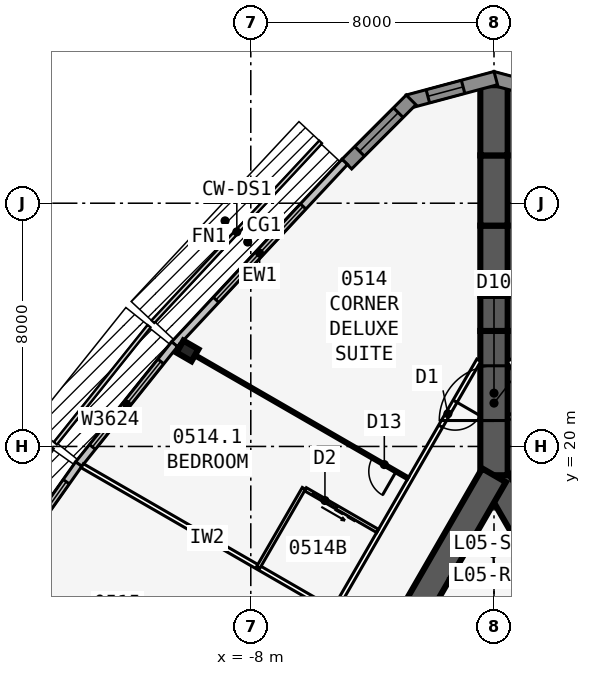
"""IFC4 building model, lengths in metres.
Left out: names, types, materials, properties, quantities, classifications, styles, units other than length and angle.
Written with IfcOpenShell. Run it as: python <this file> out.ifc"""

import sys

from ifc_helpers import new_model, si_unit, direction, frame, frame_2d, origin, origin_2d, place, context, subcontext, project, spatial, polyline, rectangle, i_section, outline, extrude, element, fill, save


model = new_model("IFC4")
c1 = context("Model", 3, precision=1e-05, world=origin(), true_north=direction((0.0, 1.0)))
c2 = subcontext(c1, "Body", "Model", "MODEL_VIEW")
j1 = project(units=[si_unit("LENGTHUNIT", "METRE"), si_unit("PLANEANGLEUNIT", "RADIAN")], contexts=[c1])
p1 = place(None, origin())
s1 = spatial("IfcSite", under=j1, at=p1, CompositionType="ELEMENT")
p2 = place(p1, origin())
s2 = spatial("IfcBuilding", under=s1, at=p2, CompositionType="ELEMENT")
p3 = place(p2, frame((0.0, 0.0, 28.5)))
s3 = spatial("IfcBuildingStorey", under=s2, at=p3, CompositionType="ELEMENT", Elevation=28.5)
p4 = place(p3, frame((16.5, -9.526, 0.0), z_axis=(0.0, 0.0, 1.0), x_axis=(-0.499999749417, 0.866025548458, 0.0)))
e1 = element("IfcWall", 1, at=p4, inside=s3, PredefinedType="SHEAR", context=c2, shape_type="SweptSolid", body=[
    extrude(rectangle(XDim=33.0, YDim=0.9, at=frame_2d((16.5, 0.0))), origin(), (0.0, 0.0, 1.0), 3.4),
])
p5 = place(p4, frame((14.15, 0.0, 0.0)))
e2 = element("IfcOpeningElement", 2, at=p5, cuts=e1, PredefinedType="OPENING", context=c2, shape_type="SweptSolid", body=[
    extrude(rectangle(XDim=1.8, YDim=2.13, at=frame_2d((0.9, 1.065))), frame((0.0, 0.46, 0.0), z_axis=(0.0, -1.0, 0.0), x_axis=(1.0, 0.0, 0.0)), (0.0, 0.0, 1.0), 0.92),
])
p6 = place(p4, frame((12.6, 0.0, 0.0)))
e3 = element("IfcOpeningElement", 3, at=p6, cuts=e1, PredefinedType="OPENING", context=c2, shape_type="SweptSolid", body=[
    extrude(rectangle(XDim=1.0, YDim=2.13, at=frame_2d((0.5, 1.065))), frame((0.0, 0.46, 0.0), z_axis=(0.0, -1.0, 0.0), x_axis=(1.0, 0.0, 0.0)), (0.0, 0.0, 1.0), 0.92),
])
p7 = place(p3, frame((0.0, 19.052, 0.0), z_axis=(0.0, 0.0, 1.0), x_axis=(-0.499999749417, -0.866025548458, 0.0)))
e4 = element("IfcWall", 4, at=p7, inside=s3, PredefinedType="SHEAR", context=c2, shape_type="SweptSolid", body=[
    extrude(rectangle(XDim=33.0, YDim=0.9, at=frame_2d((16.5, 0.0))), origin(), (0.0, 0.0, 1.0), 3.4),
])
p8 = place(p7, frame((14.15, 0.0, 0.0)))
e5 = element("IfcOpeningElement", 5, at=p8, cuts=e4, PredefinedType="OPENING", context=c2, shape_type="SweptSolid", body=[
    extrude(rectangle(XDim=1.8, YDim=2.13, at=frame_2d((0.9, 1.065))), frame((0.0, 0.46, 0.0), z_axis=(0.0, -1.0, 0.0), x_axis=(1.0, 0.0, 0.0)), (0.0, 0.0, 1.0), 0.92),
])
p9 = place(p7, frame((12.6, 0.0, 0.0)))
e6 = element("IfcOpeningElement", 6, at=p9, cuts=e4, PredefinedType="OPENING", context=c2, shape_type="SweptSolid", body=[
    extrude(rectangle(XDim=1.0, YDim=2.13, at=frame_2d((0.5, 1.065))), frame((0.0, 0.46, 0.0), z_axis=(0.0, -1.0, 0.0), x_axis=(1.0, 0.0, 0.0)), (0.0, 0.0, 1.0), 0.92),
])
p10 = place(p3, frame((0.0, 19.052, 0.0), z_axis=(0.0, 0.0, 1.0), x_axis=(0.0, 1.0, 0.0)))
e7 = element("IfcWall", 7, at=p10, inside=s3, PredefinedType="SHEAR", context=c2, shape_type="SweptSolid", body=[
    extrude(rectangle(XDim=4.746, YDim=0.9, at=frame_2d((2.373, 0.0))), origin(), (0.0, 0.0, 1.0), 3.4),
])
p11 = place(p10, frame((1.8, 0.0, 0.0)))
e8 = element("IfcOpeningElement", 8, at=p11, cuts=e7, PredefinedType="OPENING", context=c2, shape_type="SweptSolid", body=[
    extrude(rectangle(XDim=1.8, YDim=2.13, at=frame_2d((0.9, 1.065))), frame((0.0, 0.46, 0.0), z_axis=(0.0, -1.0, 0.0), x_axis=(1.0, 0.0, 0.0)), (0.0, 0.0, 1.0), 0.92),
])
p12 = place(p3, frame((0.0, 23.799, 0.0), z_axis=(0.0, 0.0, 1.0), x_axis=(0.0, 1.0, 0.0)))
e9 = element("IfcWall", 9, at=p12, inside=s3, PredefinedType="SHEAR", context=c2, shape_type="SweptSolid", body=[
    extrude(rectangle(XDim=1.155, YDim=0.9, at=frame_2d((0.577, 0.0))), origin(), (0.0, 0.0, 1.0), 3.4),
])
p13 = place(p3, frame((0.0, 24.953, 0.0), z_axis=(0.0, 0.0, 1.0), x_axis=(0.0, 1.0, 0.0)))
e10 = element("IfcWall", 10, at=p13, inside=s3, PredefinedType="SHEAR", context=c2, shape_type="SweptSolid", body=[
    extrude(rectangle(XDim=2.309, YDim=0.9, at=frame_2d((1.155, 0.0))), origin(), (0.0, 0.0, 1.0), 3.4),
])
p14 = place(p3, frame((0.0, 27.263, 0.0), z_axis=(0.0, 0.0, 1.0), x_axis=(0.0, 1.0, 0.0)))
e11 = element("IfcWall", 11, at=p14, inside=s3, PredefinedType="SHEAR", context=c2, shape_type="SweptSolid", body=[
    extrude(rectangle(XDim=2.31, YDim=0.9, at=frame_2d((1.155, 0.0))), origin(), (0.0, 0.0, 1.0), 3.4),
])
p15 = place(p3, frame((0.0, 29.572, 0.0), z_axis=(0.0, 0.0, 1.0), x_axis=(0.0, 1.0, 0.0)))
e12 = element("IfcWall", 12, at=p15, inside=s3, PredefinedType="SHEAR", context=c2, shape_type="SweptSolid", body=[
    extrude(rectangle(XDim=2.309, YDim=0.9, at=frame_2d((1.155, 0.0))), origin(), (0.0, 0.0, 1.0), 3.4),
])
p16 = place(p3, frame((-10.083, 23.142, 0.0), z_axis=(0.0, 0.0, 1.0), x_axis=(-0.5, -0.866025403784, 0.0)))
e13 = element("IfcColumn", 13, at=p16, inside=s3, PredefinedType="COLUMN", context=c2, shape_type="SweptSolid", body=[
    extrude(i_section(OverallWidth=0.455, OverallDepth=0.569, WebThickness=0.078, FlangeThickness=0.125, at=origin_2d()), origin(), (0.0, 0.0, 1.0), 3.4),
])
p17 = place(p3, frame((2.829, 31.341, 0.0), z_axis=(0.0, 0.0, 1.0), x_axis=(-0.965930548995, 0.258801419081, 0.0)))
e14 = element("IfcWall", 14, at=p17, inside=s3, PredefinedType="SOLIDWALL", context=c2, shape_type="SweptSolid", body=[
    extrude(outline(polyline([(2.989, 0.225), (2.929, 0.225), (2.438, 0.093), (2.402, 0.225), (0.0, 0.225), (0.0, -0.225), (2.989, -0.225), (2.989, 0.225)])), origin(), (0.0, 0.0, 1.0), 3.235),
])
p18 = place(p17, frame((0.676, 0.0, 0.45)))
e15 = element("IfcOpeningElement", 15, at=p18, cuts=e14, PredefinedType="OPENING", context=c2, shape_type="SweptSolid", body=[
    extrude(rectangle(XDim=1.2, YDim=2.4, at=frame_2d((0.6, 1.2))), frame((0.0, 0.235, 0.0), z_axis=(0.0, -1.0, 0.0), x_axis=(1.0, 0.0, 0.0)), (0.0, 0.0, 1.0), 0.47),
])
p19 = place(p3, frame((0.058, 32.114, 0.0), z_axis=(0.0, 0.0, 1.0), x_axis=(-0.965930548995, -0.258801419081, 0.0)))
e16 = element("IfcWall", 16, at=p19, inside=s3, PredefinedType="SOLIDWALL", context=c2, shape_type="SweptSolid", body=[
    extrude(outline(polyline([(2.989, 0.225), (0.586, 0.225), (0.551, 0.093), (0.059, 0.225), (0.0, 0.225), (0.0, -0.225), (2.989, -0.225), (2.989, 0.225)])), origin(), (0.0, 0.0, 1.0), 3.235),
])
p20 = place(p19, frame((1.113, 0.0, 0.45)))
e17 = element("IfcOpeningElement", 17, at=p20, cuts=e16, PredefinedType="OPENING", context=c2, shape_type="SweptSolid", body=[
    extrude(rectangle(XDim=1.2, YDim=2.4, at=frame_2d((0.6, 1.2))), frame((0.0, 0.235, 0.0), z_axis=(0.0, -1.0, 0.0), x_axis=(1.0, 0.0, 0.0)), (0.0, 0.0, 1.0), 0.47),
])
p21 = place(p3, frame((-2.728, 31.399, 0.0), z_axis=(0.0, 0.0, 1.0), x_axis=(-0.707106781187, -0.707106781187, 0.0)))
e18 = element("IfcWall", 18, at=p21, inside=s3, PredefinedType="SOLIDWALL", context=c2, shape_type="SweptSolid", body=[
    extrude(rectangle(XDim=2.988, YDim=0.45, at=frame_2d((1.494, 0.0))), origin(), (0.0, 0.0, 1.0), 3.235),
])
p22 = place(p21, frame((0.594, 0.0, 0.45)))
e19 = element("IfcOpeningElement", 19, at=p22, cuts=e18, PredefinedType="OPENING", context=c2, shape_type="SweptSolid", body=[
    extrude(rectangle(XDim=1.8, YDim=2.4, at=frame_2d((0.9, 1.2))), frame((0.0, 0.235, 0.0), z_axis=(0.0, -1.0, 0.0), x_axis=(1.0, 0.0, 0.0)), (0.0, 0.0, 1.0), 0.47),
])
p23 = place(p3, frame((-4.909, 29.36, 0.0), z_axis=(0.0, 0.0, 1.0), x_axis=(-0.682289646561, -0.731081964075, 0.0)))
e20 = element("IfcWall", 20, at=p23, inside=s3, PredefinedType="STANDARD", context=c2, shape_type="SweptSolid", body=[
    extrude(rectangle(XDim=8.211, YDim=0.25, at=frame_2d((4.105, 0.0))), origin(), (0.0, 0.0, 1.0), 3.235),
])
p24 = place(p23, frame((2.006, 0.0, 0.45)))
e21 = element("IfcOpeningElement", 21, at=p24, cuts=e20, PredefinedType="OPENING", context=c2, shape_type="SweptSolid", body=[
    extrude(rectangle(XDim=4.2, YDim=2.4, at=frame_2d((2.1, 1.2))), frame((0.0, 0.135, 0.0), z_axis=(0.0, -1.0, 0.0), x_axis=(1.0, 0.0, 0.0)), (0.0, 0.0, 1.0), 0.27),
])
p25 = place(p3, frame((-10.505, 23.364, 0.0), z_axis=(0.0, 0.0, 1.0), x_axis=(-0.624594965756, -0.780948864364, 0.0)))
e22 = element("IfcWall", 22, at=p25, inside=s3, PredefinedType="STANDARD", context=c2, shape_type="SweptSolid", body=[
    extrude(rectangle(XDim=5.058, YDim=0.25, at=frame_2d((2.529, 0.0))), origin(), (0.0, 0.0, 1.0), 3.235),
])
p26 = place(p25, frame((0.729, 0.0, 0.45)))
e23 = element("IfcOpeningElement", 23, at=p26, cuts=e22, PredefinedType="OPENING", context=c2, shape_type="SweptSolid", body=[
    extrude(rectangle(XDim=3.6, YDim=2.4, at=frame_2d((1.8, 1.2))), frame((0.0, 0.135, 0.0), z_axis=(0.0, -1.0, 0.0), x_axis=(1.0, 0.0, 0.0)), (0.0, 0.0, 1.0), 0.27),
])
p27 = place(p3, frame((-13.659, 19.42, 0.0), z_axis=(0.0, 0.0, 1.0), x_axis=(-0.5766431066, -0.81699616132, 0.0)))
e24 = element("IfcWall", 24, at=p27, inside=s3, PredefinedType="STANDARD", context=c2, shape_type="SweptSolid", body=[
    extrude(rectangle(XDim=5.021, YDim=0.25, at=frame_2d((2.51, 0.0))), origin(), (0.0, 0.0, 1.0), 3.235),
])
p28 = place(p27, frame((0.71, 0.0, 0.45)))
e25 = element("IfcOpeningElement", 25, at=p28, cuts=e24, PredefinedType="OPENING", context=c2, shape_type="SweptSolid", body=[
    extrude(rectangle(XDim=3.6, YDim=2.4, at=frame_2d((1.8, 1.2))), frame((0.0, 0.135, 0.0), z_axis=(0.0, -1.0, 0.0), x_axis=(1.0, 0.0, 0.0)), (0.0, 0.0, 1.0), 0.27),
])
p29 = place(p3, frame((20.027, -10.985, 0.0), z_axis=(0.0, 0.0, 1.0), x_axis=(-0.500001677587, 0.866024435227, 0.0)))
e26 = element("IfcWall", 26, at=p29, inside=s3, PredefinedType="PARTITIONING", context=c2, shape_type="SweptSolid", body=[
    extrude(rectangle(XDim=39.054, YDim=0.15, at=frame_2d((19.527, 0.0))), origin(), (0.0, 0.0, 1.0), 3.235),
])
p30 = place(p29, frame((0.352, 0.0, 0.0)))
e27 = element("IfcOpeningElement", 27, at=p30, cuts=e26, PredefinedType="OPENING", context=c2, shape_type="SweptSolid", body=[
    extrude(rectangle(XDim=0.95, YDim=2.13, at=frame_2d((0.475, 1.065))), frame((0.0, 0.085, 0.0), z_axis=(0.0, -1.0, 0.0), x_axis=(1.0, 0.0, 0.0)), (0.0, 0.0, 1.0), 0.17),
])
p31 = place(p29, frame((5.952, 0.0, 0.0)))
e28 = element("IfcOpeningElement", 28, at=p31, cuts=e26, PredefinedType="OPENING", context=c2, shape_type="SweptSolid", body=[
    extrude(rectangle(XDim=0.95, YDim=2.13, at=frame_2d((0.475, 1.065))), frame((0.0, 0.085, 0.0), z_axis=(0.0, -1.0, 0.0), x_axis=(1.0, 0.0, 0.0)), (0.0, 0.0, 1.0), 0.17),
])
p32 = place(p29, frame((12.152, 0.0, 0.0)))
e29 = element("IfcOpeningElement", 29, at=p32, cuts=e26, PredefinedType="OPENING", context=c2, shape_type="SweptSolid", body=[
    extrude(rectangle(XDim=0.95, YDim=2.13, at=frame_2d((0.475, 1.065))), frame((0.0, 0.085, 0.0), z_axis=(0.0, -1.0, 0.0), x_axis=(1.0, 0.0, 0.0)), (0.0, 0.0, 1.0), 0.17),
])
p33 = place(p29, frame((15.952, 0.0, 0.0)))
e30 = element("IfcOpeningElement", 30, at=p33, cuts=e26, PredefinedType="OPENING", context=c2, shape_type="SweptSolid", body=[
    extrude(rectangle(XDim=0.95, YDim=2.13, at=frame_2d((0.475, 1.065))), frame((0.0, 0.085, 0.0), z_axis=(0.0, -1.0, 0.0), x_axis=(1.0, 0.0, 0.0)), (0.0, 0.0, 1.0), 0.17),
])
p34 = place(p29, frame((22.152, 0.0, 0.0)))
e31 = element("IfcOpeningElement", 31, at=p34, cuts=e26, PredefinedType="OPENING", context=c2, shape_type="SweptSolid", body=[
    extrude(rectangle(XDim=0.95, YDim=2.13, at=frame_2d((0.475, 1.065))), frame((0.0, 0.085, 0.0), z_axis=(0.0, -1.0, 0.0), x_axis=(1.0, 0.0, 0.0)), (0.0, 0.0, 1.0), 0.17),
])
p35 = place(p29, frame((25.952, 0.0, 0.0)))
e32 = element("IfcOpeningElement", 32, at=p35, cuts=e26, PredefinedType="OPENING", context=c2, shape_type="SweptSolid", body=[
    extrude(rectangle(XDim=0.95, YDim=2.13, at=frame_2d((0.475, 1.065))), frame((0.0, 0.085, 0.0), z_axis=(0.0, -1.0, 0.0), x_axis=(1.0, 0.0, 0.0)), (0.0, 0.0, 1.0), 0.17),
])
p36 = place(p29, frame((36.546, 0.0, 0.0)))
e33 = element("IfcOpeningElement", 33, at=p36, cuts=e26, PredefinedType="OPENING", context=c2, shape_type="SweptSolid", body=[
    extrude(rectangle(XDim=0.95, YDim=2.13, at=frame_2d((0.475, 1.065))), frame((0.0, 0.085, 0.0), z_axis=(0.0, -1.0, 0.0), x_axis=(1.0, 0.0, 0.0)), (0.0, 0.0, 1.0), 0.17),
])
p37 = place(p3, frame((-0.5, 22.836, 0.0), z_axis=(0.0, 0.0, 1.0), x_axis=(-0.500001677587, -0.866024435227, 0.0)))
e34 = element("IfcWall", 34, at=p37, inside=s3, PredefinedType="PARTITIONING", context=c2, shape_type="SweptSolid", body=[
    extrude(rectangle(XDim=39.054, YDim=0.15, at=frame_2d((19.527, 0.0))), origin(), (0.0, 0.0, 1.0), 3.235),
])
p38 = place(p37, frame((1.558, 0.0, 0.0)))
e35 = element("IfcOpeningElement", 35, at=p38, cuts=e34, PredefinedType="OPENING", context=c2, shape_type="SweptSolid", body=[
    extrude(rectangle(XDim=0.95, YDim=2.13, at=frame_2d((0.475, 1.065))), frame((0.0, 0.085, 0.0), z_axis=(0.0, -1.0, 0.0), x_axis=(1.0, 0.0, 0.0)), (0.0, 0.0, 1.0), 0.17),
])
p39 = place(p37, frame((15.352, 0.0, 0.0)))
e36 = element("IfcOpeningElement", 36, at=p39, cuts=e34, PredefinedType="OPENING", context=c2, shape_type="SweptSolid", body=[
    extrude(rectangle(XDim=0.95, YDim=2.13, at=frame_2d((0.475, 1.065))), frame((0.0, 0.085, 0.0), z_axis=(0.0, -1.0, 0.0), x_axis=(1.0, 0.0, 0.0)), (0.0, 0.0, 1.0), 0.17),
])
p40 = place(p37, frame((22.752, 0.0, 0.0)))
e37 = element("IfcOpeningElement", 37, at=p40, cuts=e34, PredefinedType="OPENING", context=c2, shape_type="SweptSolid", body=[
    extrude(rectangle(XDim=0.95, YDim=2.13, at=frame_2d((0.475, 1.065))), frame((0.0, 0.085, 0.0), z_axis=(0.0, -1.0, 0.0), x_axis=(1.0, 0.0, 0.0)), (0.0, 0.0, 1.0), 0.17),
])
p41 = place(p37, frame((30.952, 0.0, 0.0)))
e38 = element("IfcOpeningElement", 38, at=p41, cuts=e34, PredefinedType="OPENING", context=c2, shape_type="SweptSolid", body=[
    extrude(rectangle(XDim=0.95, YDim=2.13, at=frame_2d((0.475, 1.065))), frame((0.0, 0.085, 0.0), z_axis=(0.0, -1.0, 0.0), x_axis=(1.0, 0.0, 0.0)), (0.0, 0.0, 1.0), 0.17),
])
p42 = place(p37, frame((37.752, 0.0, 0.0)))
e39 = element("IfcOpeningElement", 39, at=p42, cuts=e34, PredefinedType="OPENING", context=c2, shape_type="SweptSolid", body=[
    extrude(rectangle(XDim=0.95, YDim=2.13, at=frame_2d((0.475, 1.065))), frame((0.0, 0.085, 0.0), z_axis=(0.0, -1.0, 0.0), x_axis=(1.0, 0.0, 0.0)), (0.0, 0.0, 1.0), 0.17),
])
p43 = place(p3, frame((-2.829, 18.954, 0.0), z_axis=(0.0, 0.0, 1.0), x_axis=(-0.866020536561, 0.500008430184, 0.0)))
e40 = element("IfcWall", 40, at=p43, inside=s3, PredefinedType="PARTITIONING", context=c2, shape_type="SweptSolid", body=[
    extrude(rectangle(XDim=8.72, YDim=0.1, at=frame_2d((4.36, 0.0))), origin(), (0.0, 0.0, 1.0), 2.389),
])
p44 = place(p43, frame((0.45, 0.0, 0.0)))
e41 = element("IfcOpeningElement", 41, at=p44, cuts=e40, PredefinedType="OPENING", context=c2, shape_type="SweptSolid", body=[
    extrude(rectangle(XDim=0.9, YDim=2.13, at=frame_2d((0.45, 1.065))), frame((0.0, 0.06, 0.0), z_axis=(0.0, -1.0, 0.0), x_axis=(1.0, 0.0, 0.0)), (0.0, 0.0, 1.0), 0.12),
])
p45 = place(p3, frame((-5.329, 14.623, 0.0), z_axis=(0.0, 0.0, 1.0), x_axis=(-0.866018409083, 0.500012114982, 0.0)))
e42 = element("IfcWall", 42, at=p45, inside=s3, PredefinedType="PARTITIONING", context=c2, shape_type="SweptSolid", body=[
    extrude(rectangle(XDim=9.485, YDim=0.15, at=frame_2d((4.742, 0.0))), origin(), (0.0, 0.0, 1.0), 2.389),
])
p46 = place(p3, frame((-6.253, 18.622, 0.0), z_axis=(0.0, 0.0, 1.0), x_axis=(-0.499990139034, -0.866031096941, 0.0)))
e43 = element("IfcWall", 43, at=p46, inside=s3, PredefinedType="PLUMBINGWALL", context=c2, shape_type="SweptSolid", body=[
    extrude(rectangle(XDim=3.0, YDim=0.12, at=frame_2d((1.5, 0.0))), origin(), (0.0, 0.0, 1.0), 3.235),
])
p47 = place(p3, frame((-3.829, 17.221, 0.0), z_axis=(0.0, 0.0, 1.0), x_axis=(-0.865997131366, 0.500048966069, 0.0)))
e44 = element("IfcWall", 44, at=p47, inside=s3, PredefinedType="PLUMBINGWALL", context=c2, shape_type="SweptSolid", body=[
    extrude(rectangle(XDim=2.74, YDim=0.12, at=frame_2d((1.37, 0.0))), origin(), (0.0, 0.0, 1.0), 3.235),
])
p48 = place(p47, frame((1.55, 0.0, 0.0)))
e45 = element("IfcOpeningElement", 45, at=p48, cuts=e44, PredefinedType="OPENING", context=c2, shape_type="SweptSolid", body=[
    extrude(rectangle(XDim=0.9, YDim=2.13, at=frame_2d((0.45, 1.065))), frame((0.0, 0.07, 0.0), z_axis=(0.0, -1.0, 0.0), x_axis=(1.0, 0.0, 0.0)), (0.0, 0.0, 1.0), 0.14),
])
p49 = place(p3, frame((-1.501, 15.552, 0.0), z_axis=(0.0, 0.0, 1.0), x_axis=(1.0, 0.0, 0.0)))
e46 = element("IfcWall", 46, at=p49, inside=s3, PredefinedType="SOLIDWALL", context=c2, shape_type="SweptSolid", body=[
    extrude(rectangle(XDim=3.002, YDim=0.2, at=frame_2d((1.501, 0.0))), origin(), (0.0, 0.0, 1.0), 3.235),
])
p50 = place(p20, origin())
e47 = element("IfcWindow", 47, at=p50, inside=s3, PartitioningType="SINGLE_PANEL", PredefinedType="WINDOW", context=c2, shape_type="SweptSolid", body=[
    extrude(rectangle(XDim=1.2, YDim=2.4, at=frame_2d((0.6, 1.2))), frame((0.0, 0.03, 0.0), z_axis=(0.0, -1.0, 0.0), x_axis=(1.0, 0.0, 0.0)), (0.0, 0.0, 1.0), 0.06),
])
fill(e17, e47)
p51 = place(p22, origin())
e48 = element("IfcWindow", 48, at=p51, inside=s3, PartitioningType="SINGLE_PANEL", PredefinedType="WINDOW", context=c2, shape_type="SweptSolid", body=[
    extrude(rectangle(XDim=1.8, YDim=2.4, at=frame_2d((0.9, 1.2))), frame((0.0, 0.03, 0.0), z_axis=(0.0, -1.0, 0.0), x_axis=(1.0, 0.0, 0.0)), (0.0, 0.0, 1.0), 0.06),
])
fill(e19, e48)
p52 = place(p24, origin())
e49 = element("IfcWindow", 49, at=p52, inside=s3, PartitioningType="SINGLE_PANEL", PredefinedType="WINDOW", context=c2, shape_type="SweptSolid", body=[
    extrude(rectangle(XDim=4.2, YDim=2.4, at=frame_2d((2.1, 1.2))), frame((0.0, 0.03, 0.0), z_axis=(0.0, -1.0, 0.0), x_axis=(1.0, 0.0, 0.0)), (0.0, 0.0, 1.0), 0.06),
])
fill(e21, e49)
p53 = place(p26, origin())
e50 = element("IfcWindow", 50, at=p53, inside=s3, PartitioningType="SINGLE_PANEL", PredefinedType="WINDOW", context=c2, shape_type="SweptSolid", body=[
    extrude(rectangle(XDim=3.6, YDim=2.4, at=frame_2d((1.8, 1.2))), frame((0.0, 0.03, 0.0), z_axis=(0.0, -1.0, 0.0), x_axis=(1.0, 0.0, 0.0)), (0.0, 0.0, 1.0), 0.06),
])
fill(e23, e50)
p54 = place(p28, origin())
e51 = element("IfcWindow", 51, at=p54, inside=s3, PartitioningType="SINGLE_PANEL", PredefinedType="WINDOW", context=c2, shape_type="SweptSolid", body=[
    extrude(rectangle(XDim=3.6, YDim=2.4, at=frame_2d((1.8, 1.2))), frame((0.0, 0.03, 0.0), z_axis=(0.0, -1.0, 0.0), x_axis=(1.0, 0.0, 0.0)), (0.0, 0.0, 1.0), 0.06),
])
fill(e25, e51)
p55 = place(p44, origin())
e52 = element("IfcDoor", 52, at=p55, inside=s3, OperationType="SINGLE_SWING_LEFT", PredefinedType="DOOR", context=c2, shape_type="SweptSolid", body=[
    extrude(rectangle(XDim=0.9, YDim=2.13, at=frame_2d((0.45, 1.065))), frame((0.0, 0.025, 0.0), z_axis=(0.0, -1.0, 0.0), x_axis=(1.0, 0.0, 0.0)), (0.0, 0.0, 1.0), 0.05),
])
fill(e41, e52)
p56 = place(p38, origin())
e53 = element("IfcDoor", 53, at=p56, inside=s3, OperationType="SINGLE_SWING_LEFT", PredefinedType="DOOR", context=c2, shape_type="SweptSolid", body=[
    extrude(rectangle(XDim=0.95, YDim=2.13, at=frame_2d((0.475, 1.065))), frame((0.0, 0.025, 0.0), z_axis=(0.0, -1.0, 0.0), x_axis=(1.0, 0.0, 0.0)), (0.0, 0.0, 1.0), 0.05),
])
fill(e35, e53)
p57 = place(p48, origin())
e54 = element("IfcDoor", 54, at=p57, inside=s3, OperationType="SLIDING_TO_LEFT", PredefinedType="DOOR", context=c2, shape_type="SweptSolid", body=[
    extrude(rectangle(XDim=0.9, YDim=2.13, at=frame_2d((0.45, 1.065))), frame((0.0, 0.025, 0.0), z_axis=(0.0, -1.0, 0.0), x_axis=(1.0, 0.0, 0.0)), (0.0, 0.0, 1.0), 0.05),
])
fill(e45, e54)
p58 = place(p11, origin())
e55 = element("IfcDoor", 55, at=p58, inside=s3, OperationType="DOUBLE_DOOR_DOUBLE_SWING", PredefinedType="DOOR", context=c2, shape_type="SweptSolid", body=[
    extrude(rectangle(XDim=1.8, YDim=2.13, at=frame_2d((0.9, 1.065))), frame((0.0, 0.025, 0.0), z_axis=(0.0, -1.0, 0.0), x_axis=(1.0, 0.0, 0.0)), (0.0, 0.0, 1.0), 0.05),
])
fill(e8, e55)
save(model, sys.argv[1])
